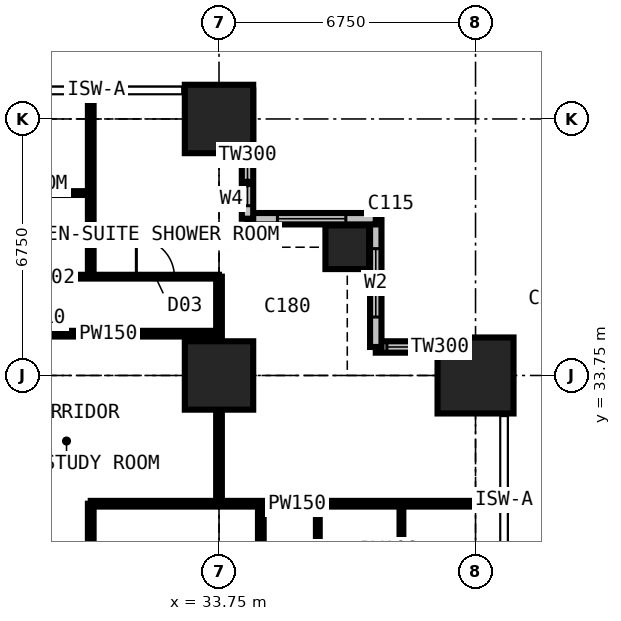
"""IFC4 building model, lengths in metres.
Left out: names, types, materials, properties, quantities, classifications, styles, units other than length and angle.
Written with IfcOpenShell. Run it as: python <this file> out.ifc"""

import sys

from ifc_helpers import new_model, si_unit, direction, frame, frame_2d, origin, origin_2d, place, context, subcontext, project, spatial, rectangle, extrude, element, fill, save


model = new_model("IFC4")
c1 = context("Model", 3, precision=1e-05, world=origin(), true_north=direction((0.0, 1.0)))
c2 = subcontext(c1, "Body", "Model", "MODEL_VIEW")
j1 = project(units=[si_unit("LENGTHUNIT", "METRE"), si_unit("PLANEANGLEUNIT", "RADIAN")], contexts=[c1])
p1 = place(None, origin())
s1 = spatial("IfcSite", under=j1, at=p1, CompositionType="ELEMENT")
p2 = place(p1, origin())
s2 = spatial("IfcBuilding", under=s1, at=p2, CompositionType="ELEMENT")
p3 = place(p2, frame((0.0, 0.0, 72.0)))
s3 = spatial("IfcBuildingStorey", under=s2, at=p3, CompositionType="ELEMENT", Elevation=72.0)
for number, where, z_axis, x_axis in (
    (1, (33.75, 33.75, 0.0), (0.0, 0.0, 1.0), (1.0, 0.0, 0.0)),
    (2, (33.75, 40.5, 0.0), (0.0, 0.0, 1.0), (1.0, 0.0, 0.0)),
):
    element("IfcColumn", number, at=place(p3, frame(where, z_axis=z_axis, x_axis=x_axis)), inside=s3, PredefinedType="COLUMN", context=c2, shape_type="SweptSolid", body=[
        extrude(rectangle(XDim=1.8, YDim=1.8, at=origin_2d()), origin(), (0.0, 0.0, 1.0), 3.6),
    ])
p4 = place(p3, frame((37.125, 37.125, 0.0), z_axis=(0.0, 0.0, 1.0), x_axis=(1.0, 0.0, 0.0)))
e3 = element("IfcColumn", 3, at=p4, inside=s3, PredefinedType="COLUMN", context=c2, shape_type="SweptSolid", body=[
    extrude(rectangle(XDim=1.15, YDim=1.15, at=origin_2d()), origin(), (0.0, 0.0, 1.0), 3.6),
])
p5 = place(p3, frame((40.5, 33.75, 0.0), z_axis=(0.0, 0.0, 1.0), x_axis=(1.0, 0.0, 0.0)))
e4 = element("IfcColumn", 4, at=p5, inside=s3, PredefinedType="COLUMN", context=c2, shape_type="SweptSolid", body=[
    extrude(rectangle(XDim=2.0, YDim=2.0, at=origin_2d()), origin(), (0.0, 0.0, 1.0), 3.6),
])
p6 = place(p3, frame((41.25, 34.5, 0.0), z_axis=(0.0, 0.0, 1.0), x_axis=(-1.0, 0.0, 0.0)))
e5 = element("IfcWall", 5, at=p6, inside=s3, PredefinedType="SOLIDWALL", context=c2, shape_type="SweptSolid", body=[
    extrude(rectangle(XDim=3.375, YDim=0.3, at=frame_2d((1.688, 0.0))), origin(), (0.0, 0.0, 1.0), 3.3),
])
p7 = place(p6, frame((1.883, 0.0, 0.9)))
e6 = element("IfcOpeningElement", 6, at=p7, cuts=e5, PredefinedType="OPENING", context=c2, shape_type="SweptSolid", body=[
    extrude(rectangle(XDim=1.2, YDim=1.8, at=frame_2d((0.6, 0.9))), frame((0.0, 0.16, 0.0), z_axis=(0.0, -1.0, 0.0), x_axis=(1.0, 0.0, 0.0)), (0.0, 0.0, 1.0), 0.32),
])
p8 = place(p3, frame((37.875, 34.5, 0.0), z_axis=(0.0, 0.0, 1.0), x_axis=(0.0, 1.0, 0.0)))
e7 = element("IfcWall", 7, at=p8, inside=s3, PredefinedType="SOLIDWALL", context=c2, shape_type="SweptSolid", body=[
    extrude(rectangle(XDim=3.375, YDim=0.3, at=frame_2d((1.688, 0.0))), origin(), (0.0, 0.0, 1.0), 3.3),
])
p9 = place(p8, frame((0.788, 0.0, 0.6)))
e8 = element("IfcOpeningElement", 8, at=p9, cuts=e7, PredefinedType="OPENING", context=c2, shape_type="SweptSolid", body=[
    extrude(rectangle(XDim=1.8, YDim=2.1, at=frame_2d((0.9, 1.05))), frame((0.0, 0.16, 0.0), z_axis=(0.0, -1.0, 0.0), x_axis=(1.0, 0.0, 0.0)), (0.0, 0.0, 1.0), 0.32),
])
p10 = place(p3, frame((37.875, 37.875, 0.0), z_axis=(0.0, 0.0, 1.0), x_axis=(-1.0, 0.0, 0.0)))
e9 = element("IfcWall", 9, at=p10, inside=s3, PredefinedType="SOLIDWALL", context=c2, shape_type="SweptSolid", body=[
    extrude(rectangle(XDim=3.375, YDim=0.3, at=frame_2d((1.688, 0.0))), origin(), (0.0, 0.0, 1.0), 3.3),
])
p11 = place(p10, frame((0.788, 0.0, 0.6)))
e10 = element("IfcOpeningElement", 10, at=p11, cuts=e9, PredefinedType="OPENING", context=c2, shape_type="SweptSolid", body=[
    extrude(rectangle(XDim=1.8, YDim=2.1, at=frame_2d((0.9, 1.05))), frame((0.0, 0.16, 0.0), z_axis=(0.0, -1.0, 0.0), x_axis=(1.0, 0.0, 0.0)), (0.0, 0.0, 1.0), 0.32),
])
p12 = place(p3, frame((34.5, 37.875, 0.0), z_axis=(0.0, 0.0, 1.0), x_axis=(0.0, 1.0, 0.0)))
e11 = element("IfcWall", 11, at=p12, inside=s3, PredefinedType="SOLIDWALL", context=c2, shape_type="SweptSolid", body=[
    extrude(rectangle(XDim=3.375, YDim=0.3, at=frame_2d((1.688, 0.0))), origin(), (0.0, 0.0, 1.0), 3.3),
])
p13 = place(p12, frame((0.343, 0.0, 0.9)))
e12 = element("IfcOpeningElement", 12, at=p13, cuts=e11, PredefinedType="OPENING", context=c2, shape_type="SweptSolid", body=[
    extrude(rectangle(XDim=1.2, YDim=1.8, at=frame_2d((0.6, 0.9))), frame((0.0, 0.16, 0.0), z_axis=(0.0, -1.0, 0.0), x_axis=(1.0, 0.0, 0.0)), (0.0, 0.0, 1.0), 0.32),
])
p14 = place(p3, frame((10.125, 36.35, 0.0), z_axis=(0.0, 0.0, 1.0), x_axis=(1.0, 0.0, 0.0)))
e13 = element("IfcWall", 13, at=p14, inside=s3, PredefinedType="PARTITIONING", context=c2, shape_type="SweptSolid", body=[
    extrude(rectangle(XDim=23.625, YDim=0.1, at=frame_2d((11.812, 0.0))), origin(), (0.0, 0.0, 1.0), 3.3),
])
p15 = place(p14, frame((21.45, 0.0, 0.0)))
e14 = element("IfcOpeningElement", 14, at=p15, cuts=e13, PredefinedType="OPENING", context=c2, shape_type="SweptSolid", body=[
    extrude(rectangle(XDim=1.0, YDim=2.2, at=frame_2d((0.5, 1.1))), frame((0.0, 0.06, 0.0), z_axis=(0.0, -1.0, 0.0), x_axis=(1.0, 0.0, 0.0)), (0.0, 0.0, 1.0), 0.12),
])
p16 = place(p14, frame((17.125, 0.0, 0.0)))
e15 = element("IfcOpeningElement", 15, at=p16, cuts=e13, PredefinedType="OPENING", context=c2, shape_type="SweptSolid", body=[
    extrude(rectangle(XDim=0.95, YDim=2.2, at=frame_2d((0.475, 1.1))), frame((0.0, 0.06, 0.0), z_axis=(0.0, -1.0, 0.0), x_axis=(1.0, 0.0, 0.0)), (0.0, 0.0, 1.0), 0.12),
])
p17 = place(p14, frame((13.7, 0.0, 0.0)))
e16 = element("IfcOpeningElement", 16, at=p17, cuts=e13, PredefinedType="OPENING", context=c2, shape_type="SweptSolid", body=[
    extrude(rectangle(XDim=0.95, YDim=2.2, at=frame_2d((0.475, 1.1))), frame((0.0, 0.06, 0.0), z_axis=(0.0, -1.0, 0.0), x_axis=(1.0, 0.0, 0.0)), (0.0, 0.0, 1.0), 0.12),
])
p18 = place(p14, frame((0.2, 0.0, 0.0)))
e17 = element("IfcOpeningElement", 17, at=p18, cuts=e13, PredefinedType="OPENING", context=c2, shape_type="SweptSolid", body=[
    extrude(rectangle(XDim=0.95, YDim=2.2, at=frame_2d((0.475, 1.1))), frame((0.0, 0.06, 0.0), z_axis=(0.0, -1.0, 0.0), x_axis=(1.0, 0.0, 0.0)), (0.0, 0.0, 1.0), 0.12),
])
p19 = place(p14, frame((3.625, 0.0, 0.0)))
e18 = element("IfcOpeningElement", 18, at=p19, cuts=e13, PredefinedType="OPENING", context=c2, shape_type="SweptSolid", body=[
    extrude(rectangle(XDim=0.95, YDim=2.2, at=frame_2d((0.475, 1.1))), frame((0.0, 0.06, 0.0), z_axis=(0.0, -1.0, 0.0), x_axis=(1.0, 0.0, 0.0)), (0.0, 0.0, 1.0), 0.12),
])
p20 = place(p14, frame((7.0, 0.0, 0.0)))
e19 = element("IfcOpeningElement", 19, at=p20, cuts=e13, PredefinedType="OPENING", context=c2, shape_type="SweptSolid", body=[
    extrude(rectangle(XDim=0.95, YDim=2.2, at=frame_2d((0.475, 1.1))), frame((0.0, 0.06, 0.0), z_axis=(0.0, -1.0, 0.0), x_axis=(1.0, 0.0, 0.0)), (0.0, 0.0, 1.0), 0.12),
])
p21 = place(p14, frame((10.375, 0.0, 0.0)))
e20 = element("IfcOpeningElement", 20, at=p21, cuts=e13, PredefinedType="OPENING", context=c2, shape_type="SweptSolid", body=[
    extrude(rectangle(XDim=0.95, YDim=2.2, at=frame_2d((0.475, 1.1))), frame((0.0, 0.06, 0.0), z_axis=(0.0, -1.0, 0.0), x_axis=(1.0, 0.0, 0.0)), (0.0, 0.0, 1.0), 0.12),
])
p22 = place(p3, frame((25.725, 34.85, 0.0), z_axis=(0.0, 0.0, 1.0), x_axis=(1.0, 0.0, 0.0)))
e21 = element("IfcWall", 21, at=p22, inside=s3, PredefinedType="PARTITIONING", context=c2, shape_type="SweptSolid", body=[
    extrude(rectangle(XDim=8.025, YDim=0.15, at=frame_2d((4.012, 0.0))), origin(), (0.0, 0.0, 1.0), 3.3),
])
p23 = place(p3, frame((28.375, 38.55, 0.0), z_axis=(0.0, 0.0, 1.0), x_axis=(1.0, 0.0, 0.0)))
e22 = element("IfcWall", 22, at=p23, inside=s3, PredefinedType="PARTITIONING", context=c2, shape_type="SweptSolid", body=[
    extrude(rectangle(XDim=2.0, YDim=0.1, at=frame_2d((1.0, 0.0))), origin(), (0.0, 0.0, 1.0), 3.3),
])
p24 = place(p3, frame((30.375, 29.2, 0.0), z_axis=(0.0, 0.0, 1.0), x_axis=(0.0, 1.0, 0.0)))
e23 = element("IfcWall", 23, at=p24, inside=s3, PredefinedType="PARTITIONING", context=c2, shape_type="SweptSolid", body=[
    extrude(rectangle(XDim=1.175, YDim=0.15, at=frame_2d((0.587, 0.0))), origin(), (0.0, 0.0, 1.0), 3.3),
])
p25 = place(p3, frame((30.375, 30.375, 0.0), z_axis=(0.0, 0.0, 1.0), x_axis=(1.0, 0.0, 0.0)))
e24 = element("IfcWall", 24, at=p25, inside=s3, PredefinedType="PARTITIONING", context=c2, shape_type="SweptSolid", body=[
    extrude(rectangle(XDim=10.859, YDim=0.15, at=frame_2d((5.429, 0.0))), origin(), (0.0, 0.0, 1.0), 3.3),
])
p26 = place(p3, frame((30.375, 36.35, 0.0), z_axis=(0.0, 0.0, 1.0), x_axis=(0.0, 1.0, 0.0)))
e25 = element("IfcWall", 25, at=p26, inside=s3, PredefinedType="PARTITIONING", context=c2, shape_type="SweptSolid", body=[
    extrude(rectangle(XDim=4.884, YDim=0.15, at=frame_2d((2.442, 0.0))), origin(), (0.0, 0.0, 1.0), 3.3),
])
p27 = place(p3, frame((33.75, 30.375, 0.0), z_axis=(0.0, 0.0, 1.0), x_axis=(0.0, 1.0, 0.0)))
e26 = element("IfcWall", 26, at=p27, inside=s3, PredefinedType="PARTITIONING", context=c2, shape_type="SweptSolid", body=[
    extrude(rectangle(XDim=5.975, YDim=0.15, at=frame_2d((2.988, 0.0))), origin(), (0.0, 0.0, 1.0), 2.802),
])
p28 = place(p3, frame((34.85, 12.55, 0.0), z_axis=(0.0, 0.0, 1.0), x_axis=(0.0, 1.0, 0.0)))
e27 = element("IfcWall", 27, at=p28, inside=s3, PredefinedType="PARTITIONING", context=c2, shape_type="SweptSolid", body=[
    extrude(rectangle(XDim=17.825, YDim=0.15, at=frame_2d((8.913, 0.0))), origin(), (0.0, 0.0, 1.0), 3.3),
])
p29 = place(p28, frame((8.6, 0.0, 0.0)))
e28 = element("IfcOpeningElement", 28, at=p29, cuts=e27, PredefinedType="OPENING", context=c2, shape_type="SweptSolid", body=[
    extrude(rectangle(XDim=0.95, YDim=2.2, at=frame_2d((0.475, 1.1))), frame((0.0, 0.085, 0.0), z_axis=(0.0, -1.0, 0.0), x_axis=(1.0, 0.0, 0.0)), (0.0, 0.0, 1.0), 0.17),
])
p30 = place(p3, frame((36.35, 6.75, 0.0), z_axis=(0.0, 0.0, 1.0), x_axis=(0.0, 1.0, 0.0)))
e29 = element("IfcWall", 29, at=p30, inside=s3, PredefinedType="PARTITIONING", context=c2, shape_type="SweptSolid", body=[
    extrude(rectangle(XDim=23.625, YDim=0.1, at=frame_2d((11.812, 0.0))), origin(), (0.0, 0.0, 1.0), 3.3),
])
p31 = place(p30, frame((3.575, 0.0, 0.0)))
e30 = element("IfcOpeningElement", 30, at=p31, cuts=e29, PredefinedType="OPENING", context=c2, shape_type="SweptSolid", body=[
    extrude(rectangle(XDim=0.95, YDim=2.2, at=frame_2d((0.475, 1.1))), frame((0.0, 0.06, 0.0), z_axis=(0.0, -1.0, 0.0), x_axis=(1.0, 0.0, 0.0)), (0.0, 0.0, 1.0), 0.12),
])
p32 = place(p30, frame((7.0, 0.0, 0.0)))
e31 = element("IfcOpeningElement", 31, at=p32, cuts=e29, PredefinedType="OPENING", context=c2, shape_type="SweptSolid", body=[
    extrude(rectangle(XDim=0.95, YDim=2.2, at=frame_2d((0.475, 1.1))), frame((0.0, 0.06, 0.0), z_axis=(0.0, -1.0, 0.0), x_axis=(1.0, 0.0, 0.0)), (0.0, 0.0, 1.0), 0.12),
])
p33 = place(p30, frame((10.375, 0.0, 0.0)))
e32 = element("IfcOpeningElement", 32, at=p33, cuts=e29, PredefinedType="OPENING", context=c2, shape_type="SweptSolid", body=[
    extrude(rectangle(XDim=0.95, YDim=2.2, at=frame_2d((0.475, 1.1))), frame((0.0, 0.06, 0.0), z_axis=(0.0, -1.0, 0.0), x_axis=(1.0, 0.0, 0.0)), (0.0, 0.0, 1.0), 0.12),
])
p34 = place(p30, frame((13.75, 0.0, 0.0)))
e33 = element("IfcOpeningElement", 33, at=p34, cuts=e29, PredefinedType="OPENING", context=c2, shape_type="SweptSolid", body=[
    extrude(rectangle(XDim=0.95, YDim=2.2, at=frame_2d((0.475, 1.1))), frame((0.0, 0.06, 0.0), z_axis=(0.0, -1.0, 0.0), x_axis=(1.0, 0.0, 0.0)), (0.0, 0.0, 1.0), 0.12),
])
p35 = place(p30, frame((17.125, 0.0, 0.0)))
e34 = element("IfcOpeningElement", 34, at=p35, cuts=e29, PredefinedType="OPENING", context=c2, shape_type="SweptSolid", body=[
    extrude(rectangle(XDim=0.95, YDim=2.2, at=frame_2d((0.475, 1.1))), frame((0.0, 0.06, 0.0), z_axis=(0.0, -1.0, 0.0), x_axis=(1.0, 0.0, 0.0)), (0.0, 0.0, 1.0), 0.12),
])
p36 = place(p30, frame((20.5, 0.0, 0.0)))
e35 = element("IfcOpeningElement", 35, at=p36, cuts=e29, PredefinedType="OPENING", context=c2, shape_type="SweptSolid", body=[
    extrude(rectangle(XDim=0.95, YDim=2.2, at=frame_2d((0.475, 1.1))), frame((0.0, 0.06, 0.0), z_axis=(0.0, -1.0, 0.0), x_axis=(1.0, 0.0, 0.0)), (0.0, 0.0, 1.0), 0.12),
])
p37 = place(p3, frame((38.55, 28.375, 0.0), z_axis=(0.0, 0.0, 1.0), x_axis=(0.0, 1.0, 0.0)))
e36 = element("IfcWall", 36, at=p37, inside=s3, PredefinedType="PARTITIONING", context=c2, shape_type="SweptSolid", body=[
    extrude(rectangle(XDim=2.0, YDim=0.1, at=frame_2d((1.0, 0.0))), origin(), (0.0, 0.0, 1.0), 3.3),
])
p38 = place(p7, origin())
e37 = element("IfcWindow", 37, at=p38, inside=s3, PartitioningType="SINGLE_PANEL", PredefinedType="WINDOW", context=c2, shape_type="SweptSolid", body=[
    extrude(rectangle(XDim=1.2, YDim=1.8, at=frame_2d((0.6, 0.9))), frame((0.0, 0.03, 0.0), z_axis=(0.0, -1.0, 0.0), x_axis=(1.0, 0.0, 0.0)), (0.0, 0.0, 1.0), 0.06),
])
fill(e6, e37)
p39 = place(p9, origin())
e38 = element("IfcWindow", 38, at=p39, inside=s3, PartitioningType="SINGLE_PANEL", PredefinedType="WINDOW", context=c2, shape_type="SweptSolid", body=[
    extrude(rectangle(XDim=1.8, YDim=2.1, at=frame_2d((0.9, 1.05))), frame((0.0, 0.03, 0.0), z_axis=(0.0, -1.0, 0.0), x_axis=(1.0, 0.0, 0.0)), (0.0, 0.0, 1.0), 0.06),
])
fill(e8, e38)
p40 = place(p11, origin())
e39 = element("IfcWindow", 39, at=p40, inside=s3, PartitioningType="SINGLE_PANEL", PredefinedType="WINDOW", context=c2, shape_type="SweptSolid", body=[
    extrude(rectangle(XDim=1.8, YDim=2.1, at=frame_2d((0.9, 1.05))), frame((0.0, 0.03, 0.0), z_axis=(0.0, -1.0, 0.0), x_axis=(1.0, 0.0, 0.0)), (0.0, 0.0, 1.0), 0.06),
])
fill(e10, e39)
p41 = place(p13, origin())
e40 = element("IfcWindow", 40, at=p41, inside=s3, PartitioningType="SINGLE_PANEL", PredefinedType="WINDOW", context=c2, shape_type="SweptSolid", body=[
    extrude(rectangle(XDim=1.2, YDim=1.8, at=frame_2d((0.6, 0.9))), frame((0.0, 0.03, 0.0), z_axis=(0.0, -1.0, 0.0), x_axis=(1.0, 0.0, 0.0)), (0.0, 0.0, 1.0), 0.06),
])
fill(e12, e40)
p42 = place(p15, origin())
e41 = element("IfcDoor", 41, at=p42, inside=s3, OperationType="SINGLE_SWING_LEFT", PredefinedType="DOOR", context=c2, shape_type="SweptSolid", body=[
    extrude(rectangle(XDim=1.0, YDim=2.2, at=frame_2d((0.5, 1.1))), frame((0.0, 0.025, 0.0), z_axis=(0.0, -1.0, 0.0), x_axis=(1.0, 0.0, 0.0)), (0.0, 0.0, 1.0), 0.05),
])
fill(e14, e41)
save(model, sys.argv[1])
